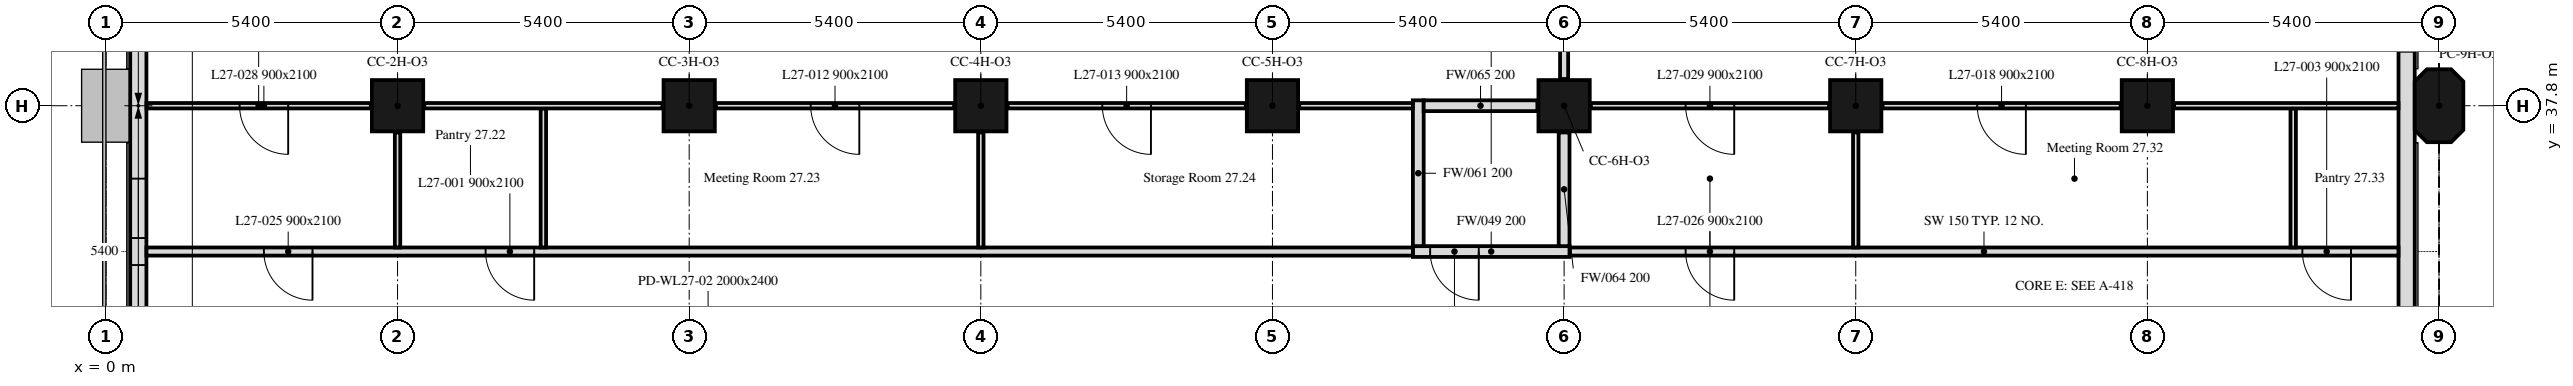
"""IFC4 building model, lengths in metres.
Left out: names, types, materials, properties, quantities, classifications, styles, units other than length and angle.
Written with IfcOpenShell. Run it as: python <this file> out.ifc"""

import sys

from ifc_helpers import new_model, si_unit, direction, frame, frame_2d, origin, origin_2d, place, context, subcontext, project, spatial, polyline, rectangle, outline, extrude, element, fill, save


model = new_model("IFC4")
c1 = context("Model", 3, precision=1e-05, world=origin(), true_north=direction((0.0, 1.0)))
c2 = subcontext(c1, "Body", "Model", "MODEL_VIEW")
j1 = project(units=[si_unit("LENGTHUNIT", "METRE"), si_unit("PLANEANGLEUNIT", "RADIAN")], contexts=[c1])
p1 = place(None, origin())
s1 = spatial("IfcSite", under=j1, at=p1, CompositionType="ELEMENT")
p2 = place(p1, origin())
s2 = spatial("IfcBuilding", under=s1, at=p2, CompositionType="ELEMENT")
p3 = place(p2, frame((0.0, 0.0, 114.4)))
s3 = spatial("IfcBuildingStorey", under=s2, at=p3, CompositionType="ELEMENT", Elevation=114.4)
for number, where, z_axis, x_axis in (
    (1, (5.4, 37.8, 0.0), (0.0, 0.0, 1.0), (1.0, 0.0, 0.0)),
    (2, (10.8, 37.8, 0.0), (0.0, 0.0, 1.0), (1.0, 0.0, 0.0)),
    (3, (16.2, 37.8, 0.0), (0.0, 0.0, 1.0), (1.0, 0.0, 0.0)),
    (4, (21.6, 37.8, 0.0), (0.0, 0.0, 1.0), (1.0, 0.0, 0.0)),
    (5, (27.0, 37.8, 0.0), (0.0, 0.0, 1.0), (1.0, 0.0, 0.0)),
    (6, (32.4, 37.8, 0.0), (0.0, 0.0, 1.0), (1.0, 0.0, 0.0)),
    (7, (37.8, 37.8, 0.0), (0.0, 0.0, 1.0), (1.0, 0.0, 0.0)),
):
    element("IfcColumn", number, at=place(p3, frame(where, z_axis=z_axis, x_axis=x_axis)), inside=s3, PredefinedType="COLUMN", context=c2, shape_type="SweptSolid", body=[
        extrude(rectangle(XDim=0.95, YDim=0.95, at=origin_2d()), origin(), (0.0, 0.0, 1.0), 3.5),
    ])
p4 = place(p3, frame((43.2, 37.8, 0.0), z_axis=(0.0, 0.0, 1.0), x_axis=(0.0, 1.0, 0.0)))
e8 = element("IfcColumn", 8, at=p4, inside=s3, PredefinedType="COLUMN", context=c2, shape_type="SweptSolid", body=[
    extrude(outline(polyline([(-0.45, -0.45), (0.45, -0.45), (0.675, -0.225), (0.675, 0.225), (0.45, 0.45), (-0.45, 0.45), (-0.675, 0.225), (-0.675, -0.225), (-0.45, -0.45)])), origin(), (0.0, 0.0, 1.0), 3.5),
])
p5 = place(p3, frame((42.6, 32.4, 0.0), z_axis=(0.0, 0.0, 1.0), x_axis=(0.0, 1.0, 0.0)))
e9 = element("IfcWall", 9, at=p5, inside=s3, PredefinedType="SOLIDWALL", context=c2, shape_type="SweptSolid", body=[
    extrude(rectangle(XDim=10.614, YDim=0.3, at=frame_2d((5.307, 0.0))), origin(), (0.0, 0.0, 1.0), 3.5),
])
p6 = place(p5, frame((6.4, 0.0, 0.9)))
e10 = element("IfcOpeningElement", 10, at=p6, cuts=e9, PredefinedType="OPENING", context=c2, shape_type="SweptSolid", body=[
    extrude(rectangle(XDim=3.4, YDim=1.7, at=frame_2d((1.7, 0.85))), frame((0.0, 0.16, 0.0), z_axis=(0.0, -1.0, 0.0), x_axis=(1.0, 0.0, 0.0)), (0.0, 0.0, 1.0), 0.32),
])
p7 = place(p3, frame((0.6, 43.014, 0.0), z_axis=(0.0, 0.0, 1.0), x_axis=(0.0, -1.0, 0.0)))
e11 = element("IfcWall", 11, at=p7, inside=s3, PredefinedType="SOLIDWALL", context=c2, shape_type="SweptSolid", body=[
    extrude(rectangle(XDim=32.027, YDim=0.3, at=frame_2d((16.014, 0.0))), origin(), (0.0, 0.0, 1.0), 3.5),
])
p8 = place(p7, frame((6.564, 0.0, 0.9)))
e12 = element("IfcOpeningElement", 12, at=p8, cuts=e11, PredefinedType="OPENING", context=c2, shape_type="SweptSolid", body=[
    extrude(rectangle(XDim=1.1, YDim=1.7, at=frame_2d((0.55, 0.85))), frame((0.0, 0.16, 0.0), z_axis=(0.0, -1.0, 0.0), x_axis=(1.0, 0.0, 0.0)), (0.0, 0.0, 1.0), 0.32),
])
p9 = place(p7, frame((8.164, 0.0, 0.9)))
e13 = element("IfcOpeningElement", 13, at=p9, cuts=e11, PredefinedType="OPENING", context=c2, shape_type="SweptSolid", body=[
    extrude(rectangle(XDim=1.1, YDim=1.7, at=frame_2d((0.55, 0.85))), frame((0.0, 0.16, 0.0), z_axis=(0.0, -1.0, 0.0), x_axis=(1.0, 0.0, 0.0)), (0.0, 0.0, 1.0), 0.32),
])
p10 = place(p7, frame((17.014, 0.0, 0.9)))
e14 = element("IfcOpeningElement", 14, at=p10, cuts=e11, PredefinedType="OPENING", context=c2, shape_type="SweptSolid", body=[
    extrude(rectangle(XDim=3.4, YDim=1.7, at=frame_2d((1.7, 0.85))), frame((0.0, 0.16, 0.0), z_axis=(0.0, -1.0, 0.0), x_axis=(1.0, 0.0, 0.0)), (0.0, 0.0, 1.0), 0.32),
])
p11 = place(p7, frame((28.164, 0.0, 0.9)))
e15 = element("IfcOpeningElement", 15, at=p11, cuts=e11, PredefinedType="OPENING", context=c2, shape_type="SweptSolid", body=[
    extrude(rectangle(XDim=1.1, YDim=1.7, at=frame_2d((0.55, 0.85))), frame((0.0, 0.16, 0.0), z_axis=(0.0, -1.0, 0.0), x_axis=(1.0, 0.0, 0.0)), (0.0, 0.0, 1.0), 0.32),
])
p12 = place(p7, frame((29.764, 0.0, 0.9)))
e16 = element("IfcOpeningElement", 16, at=p12, cuts=e11, PredefinedType="OPENING", context=c2, shape_type="SweptSolid", body=[
    extrude(rectangle(XDim=1.1, YDim=1.7, at=frame_2d((0.55, 0.85))), frame((0.0, 0.16, 0.0), z_axis=(0.0, -1.0, 0.0), x_axis=(1.0, 0.0, 0.0)), (0.0, 0.0, 1.0), 0.32),
])
p13 = place(p3, frame((42.449, 35.1, 0.0), z_axis=(0.0, 0.0, 1.0), x_axis=(-1.0, 0.0, 0.0)))
e17 = element("IfcWall", 17, at=p13, inside=s3, PredefinedType="PARTITIONING", context=c2, shape_type="SweptSolid", body=[
    extrude(rectangle(XDim=15.349, YDim=0.15, at=frame_2d((7.674, 0.0))), origin(), (0.0, 0.0, 1.0), 2.75),
])
p14 = place(p13, frame((0.879, 0.0, 0.0)))
e18 = element("IfcOpeningElement", 18, at=p14, cuts=e17, PredefinedType="OPENING", context=c2, shape_type="SweptSolid", body=[
    extrude(rectangle(XDim=0.9, YDim=2.1, at=frame_2d((0.45, 1.05))), frame((0.0, 0.075, 0.0), z_axis=(0.0, -1.0, 0.0), x_axis=(1.0, 0.0, 0.0)), (0.0, 0.0, 1.0), 0.15),
])
p15 = place(p13, frame((12.299, 0.0, 0.0)))
e19 = element("IfcOpeningElement", 19, at=p15, cuts=e17, PredefinedType="OPENING", context=c2, shape_type="SweptSolid", body=[
    extrude(rectangle(XDim=0.9, YDim=2.1, at=frame_2d((0.45, 1.05))), frame((0.0, 0.075, 0.0), z_axis=(0.0, -1.0, 0.0), x_axis=(1.0, 0.0, 0.0)), (0.0, 0.0, 1.0), 0.15),
])
p16 = place(p3, frame((27.1, 35.1, 0.0), z_axis=(0.0, 0.0, 1.0), x_axis=(-1.0, 0.0, 0.0)))
e20 = element("IfcWall", 20, at=p16, inside=s3, PredefinedType="PARTITIONING", context=c2, shape_type="SweptSolid", body=[
    extrude(rectangle(XDim=2.9, YDim=0.2, at=frame_2d((1.45, 0.0))), origin(), (0.0, 0.0, 1.0), 2.75),
])
p17 = place(p16, frame((1.68, 0.0, 0.0)))
e21 = element("IfcOpeningElement", 21, at=p17, cuts=e20, PredefinedType="OPENING", context=c2, shape_type="SweptSolid", body=[
    extrude(rectangle(XDim=0.9, YDim=2.1, at=frame_2d((0.45, 1.05))), frame((0.0, 0.1, 0.0), z_axis=(0.0, -1.0, 0.0), x_axis=(1.0, 0.0, 0.0)), (0.0, 0.0, 1.0), 0.2),
])
p18 = place(p3, frame((24.2, 35.1, 0.0), z_axis=(0.0, 0.0, 1.0), x_axis=(-1.0, 0.0, 0.0)))
e22 = element("IfcWall", 22, at=p18, inside=s3, PredefinedType="PARTITIONING", context=c2, shape_type="SweptSolid", body=[
    extrude(rectangle(XDim=23.449, YDim=0.15, at=frame_2d((11.725, 0.0))), origin(), (0.0, 0.0, 1.0), 2.75),
])
p19 = place(p18, frame((16.27, 0.0, 0.0)))
e23 = element("IfcOpeningElement", 23, at=p19, cuts=e22, PredefinedType="OPENING", context=c2, shape_type="SweptSolid", body=[
    extrude(rectangle(XDim=0.9, YDim=2.1, at=frame_2d((0.45, 1.05))), frame((0.0, 0.075, 0.0), z_axis=(0.0, -1.0, 0.0), x_axis=(1.0, 0.0, 0.0)), (0.0, 0.0, 1.0), 0.15),
])
p20 = place(p18, frame((20.375, 0.0, 0.0)))
e24 = element("IfcOpeningElement", 24, at=p20, cuts=e22, PredefinedType="OPENING", context=c2, shape_type="SweptSolid", body=[
    extrude(rectangle(XDim=0.9, YDim=2.1, at=frame_2d((0.45, 1.05))), frame((0.0, 0.075, 0.0), z_axis=(0.0, -1.0, 0.0), x_axis=(1.0, 0.0, 0.0)), (0.0, 0.0, 1.0), 0.15),
])
p21 = place(p3, frame((4.905, 37.8, 0.0), z_axis=(0.0, 0.0, 1.0), x_axis=(-1.0, 0.0, 0.0)))
e25 = element("IfcWall", 25, at=p21, inside=s3, PredefinedType="PARTITIONING", context=c2, shape_type="SweptSolid", body=[
    extrude(rectangle(XDim=4.154, YDim=0.1, at=frame_2d((2.077, 0.0))), origin(), (0.0, 0.0, 1.0), 2.75),
])
p22 = place(p21, frame((1.53, 0.0, 0.0)))
e26 = element("IfcOpeningElement", 26, at=p22, cuts=e25, PredefinedType="OPENING", context=c2, shape_type="SweptSolid", body=[
    extrude(rectangle(XDim=0.9, YDim=2.1, at=frame_2d((0.45, 1.05))), frame((0.0, 0.05, 0.0), z_axis=(0.0, -1.0, 0.0), x_axis=(1.0, 0.0, 0.0)), (0.0, 0.0, 1.0), 0.1),
])
p23 = place(p3, frame((5.4, 35.175, 0.0), z_axis=(0.0, 0.0, 1.0), x_axis=(0.0, 1.0, 0.0)))
e27 = element("IfcWall", 27, at=p23, inside=s3, PredefinedType="PARTITIONING", context=c2, shape_type="SweptSolid", body=[
    extrude(rectangle(XDim=2.13, YDim=0.1, at=frame_2d((1.065, 0.0))), origin(), (0.0, 0.0, 1.0), 3.5),
])
p24 = place(p3, frame((8.1, 35.175, 0.0), z_axis=(0.0, 0.0, 1.0), x_axis=(0.0, 1.0, 0.0)))
e28 = element("IfcWall", 28, at=p24, inside=s3, PredefinedType="PARTITIONING", context=c2, shape_type="SweptSolid", body=[
    extrude(rectangle(XDim=2.575, YDim=0.1, at=frame_2d((1.288, 0.0))), origin(), (0.0, 0.0, 1.0), 3.5),
])
p25 = place(p3, frame((16.2, 35.175, 0.0), z_axis=(0.0, 0.0, 1.0), x_axis=(0.0, 1.0, 0.0)))
e29 = element("IfcWall", 29, at=p25, inside=s3, PredefinedType="PARTITIONING", context=c2, shape_type="SweptSolid", body=[
    extrude(rectangle(XDim=2.13, YDim=0.1, at=frame_2d((1.065, 0.0))), origin(), (0.0, 0.0, 1.0), 2.75),
])
p26 = place(p3, frame((15.705, 37.8, 0.0), z_axis=(0.0, 0.0, 1.0), x_axis=(-1.0, 0.0, 0.0)))
e30 = element("IfcWall", 30, at=p26, inside=s3, PredefinedType="PARTITIONING", context=c2, shape_type="SweptSolid", body=[
    extrude(rectangle(XDim=4.41, YDim=0.1, at=frame_2d((2.205, 0.0))), origin(), (0.0, 0.0, 1.0), 2.75),
])
p27 = place(p26, frame((1.755, 0.0, 0.0)))
e31 = element("IfcOpeningElement", 31, at=p27, cuts=e30, PredefinedType="OPENING", context=c2, shape_type="SweptSolid", body=[
    extrude(rectangle(XDim=0.9, YDim=2.1, at=frame_2d((0.45, 1.05))), frame((0.0, 0.05, 0.0), z_axis=(0.0, -1.0, 0.0), x_axis=(1.0, 0.0, 0.0)), (0.0, 0.0, 1.0), 0.1),
])
p28 = place(p3, frame((10.305, 37.8, 0.0), z_axis=(0.0, 0.0, 1.0), x_axis=(-1.0, 0.0, 0.0)))
e32 = element("IfcWall", 32, at=p28, inside=s3, PredefinedType="PARTITIONING", context=c2, shape_type="SweptSolid", body=[
    extrude(rectangle(XDim=4.41, YDim=0.1, at=frame_2d((2.205, 0.0))), origin(), (0.0, 0.0, 1.0), 2.75),
])
p29 = place(p3, frame((24.3, 35.2, 0.0), z_axis=(0.0, 0.0, 1.0), x_axis=(0.0, 1.0, 0.0)))
e33 = element("IfcWall", 33, at=p29, inside=s3, PredefinedType="PARTITIONING", context=c2, shape_type="SweptSolid", body=[
    extrude(rectangle(XDim=2.7, YDim=0.2, at=frame_2d((1.35, 0.0))), origin(), (0.0, 0.0, 1.0), 3.5),
])
p30 = place(p3, frame((24.2, 37.8, 0.0), z_axis=(0.0, 0.0, 1.0), x_axis=(-1.0, 0.0, 0.0)))
e34 = element("IfcWall", 34, at=p30, inside=s3, PredefinedType="PARTITIONING", context=c2, shape_type="SweptSolid", body=[
    extrude(rectangle(XDim=2.105, YDim=0.1, at=frame_2d((1.052, 0.0))), origin(), (0.0, 0.0, 1.0), 3.5),
])
p31 = place(p3, frame((21.105, 37.8, 0.0), z_axis=(0.0, 0.0, 1.0), x_axis=(-1.0, 0.0, 0.0)))
e35 = element("IfcWall", 35, at=p31, inside=s3, PredefinedType="PARTITIONING", context=c2, shape_type="SweptSolid", body=[
    extrude(rectangle(XDim=4.41, YDim=0.1, at=frame_2d((2.205, 0.0))), origin(), (0.0, 0.0, 1.0), 3.5),
])
p32 = place(p31, frame((1.755, 0.0, 0.0)))
e36 = element("IfcOpeningElement", 36, at=p32, cuts=e35, PredefinedType="OPENING", context=c2, shape_type="SweptSolid", body=[
    extrude(rectangle(XDim=0.9, YDim=2.1, at=frame_2d((0.45, 1.05))), frame((0.0, 0.05, 0.0), z_axis=(0.0, -1.0, 0.0), x_axis=(1.0, 0.0, 0.0)), (0.0, 0.0, 1.0), 0.1),
])
p33 = place(p3, frame((27.0, 35.2, 0.0), z_axis=(0.0, 0.0, 1.0), x_axis=(0.0, 1.0, 0.0)))
e37 = element("IfcWall", 37, at=p33, inside=s3, PredefinedType="PARTITIONING", context=c2, shape_type="SweptSolid", body=[
    extrude(rectangle(XDim=2.105, YDim=0.2, at=frame_2d((1.052, 0.0))), origin(), (0.0, 0.0, 1.0), 2.75),
])
p34 = place(p3, frame((26.505, 37.8, 0.0), z_axis=(0.0, 0.0, 1.0), x_axis=(-1.0, 0.0, 0.0)))
e38 = element("IfcWall", 38, at=p34, inside=s3, PredefinedType="PARTITIONING", context=c2, shape_type="SweptSolid", body=[
    extrude(rectangle(XDim=2.105, YDim=0.2, at=frame_2d((1.052, 0.0))), origin(), (0.0, 0.0, 1.0), 3.5),
])
p35 = place(p3, frame((27.0, 38.295, 0.0), z_axis=(0.0, 0.0, 1.0), x_axis=(0.0, 1.0, 0.0)))
e39 = element("IfcWall", 39, at=p35, inside=s3, PredefinedType="PARTITIONING", context=c2, shape_type="SweptSolid", body=[
    extrude(rectangle(XDim=4.41, YDim=0.15, at=frame_2d((2.205, 0.0))), origin(), (0.0, 0.0, 1.0), 2.75),
])
p36 = place(p3, frame((32.4, 35.175, 0.0), z_axis=(0.0, 0.0, 1.0), x_axis=(0.0, 1.0, 0.0)))
e40 = element("IfcWall", 40, at=p36, inside=s3, PredefinedType="PARTITIONING", context=c2, shape_type="SweptSolid", body=[
    extrude(rectangle(XDim=2.13, YDim=0.1, at=frame_2d((1.065, 0.0))), origin(), (0.0, 0.0, 1.0), 2.75),
])
p37 = place(p3, frame((31.905, 37.8, 0.0), z_axis=(0.0, 0.0, 1.0), x_axis=(-1.0, 0.0, 0.0)))
e41 = element("IfcWall", 41, at=p37, inside=s3, PredefinedType="PARTITIONING", context=c2, shape_type="SweptSolid", body=[
    extrude(rectangle(XDim=4.41, YDim=0.1, at=frame_2d((2.205, 0.0))), origin(), (0.0, 0.0, 1.0), 3.5),
])
p38 = place(p37, frame((1.755, 0.0, 0.0)))
e42 = element("IfcOpeningElement", 42, at=p38, cuts=e41, PredefinedType="OPENING", context=c2, shape_type="SweptSolid", body=[
    extrude(rectangle(XDim=0.9, YDim=2.1, at=frame_2d((0.45, 1.05))), frame((0.0, 0.05, 0.0), z_axis=(0.0, -1.0, 0.0), x_axis=(1.0, 0.0, 0.0)), (0.0, 0.0, 1.0), 0.1),
])
p39 = place(p3, frame((40.5, 35.175, 0.0), z_axis=(0.0, 0.0, 1.0), x_axis=(0.0, 1.0, 0.0)))
e43 = element("IfcWall", 43, at=p39, inside=s3, PredefinedType="PARTITIONING", context=c2, shape_type="SweptSolid", body=[
    extrude(rectangle(XDim=2.575, YDim=0.1, at=frame_2d((1.288, 0.0))), origin(), (0.0, 0.0, 1.0), 3.5),
])
p40 = place(p3, frame((37.305, 37.8, 0.0), z_axis=(0.0, 0.0, 1.0), x_axis=(-1.0, 0.0, 0.0)))
e44 = element("IfcWall", 44, at=p40, inside=s3, PredefinedType="PARTITIONING", context=c2, shape_type="SweptSolid", body=[
    extrude(rectangle(XDim=4.41, YDim=0.1, at=frame_2d((2.205, 0.0))), origin(), (0.0, 0.0, 1.0), 3.5),
])
p41 = place(p40, frame((1.755, 0.0, 0.0)))
e45 = element("IfcOpeningElement", 45, at=p41, cuts=e44, PredefinedType="OPENING", context=c2, shape_type="SweptSolid", body=[
    extrude(rectangle(XDim=0.9, YDim=2.1, at=frame_2d((0.45, 1.05))), frame((0.0, 0.05, 0.0), z_axis=(0.0, -1.0, 0.0), x_axis=(1.0, 0.0, 0.0)), (0.0, 0.0, 1.0), 0.1),
])
p42 = place(p3, frame((42.449, 37.8, 0.0), z_axis=(0.0, 0.0, 1.0), x_axis=(-1.0, 0.0, 0.0)))
e46 = element("IfcWall", 46, at=p42, inside=s3, PredefinedType="PARTITIONING", context=c2, shape_type="SweptSolid", body=[
    extrude(rectangle(XDim=4.154, YDim=0.1, at=frame_2d((2.077, 0.0))), origin(), (0.0, 0.0, 1.0), 3.5),
])
p43 = place(p6, origin())
e47 = element("IfcWindow", 47, at=p43, inside=s3, PartitioningType="SINGLE_PANEL", PredefinedType="WINDOW", context=c2, shape_type="SweptSolid", body=[
    extrude(rectangle(XDim=3.4, YDim=1.7, at=frame_2d((1.7, 0.85))), frame((0.0, 0.03, 0.0), z_axis=(0.0, -1.0, 0.0), x_axis=(1.0, 0.0, 0.0)), (0.0, 0.0, 1.0), 0.06),
])
fill(e10, e47)
p44 = place(p8, origin())
e48 = element("IfcWindow", 48, at=p44, inside=s3, PartitioningType="SINGLE_PANEL", PredefinedType="WINDOW", context=c2, shape_type="SweptSolid", body=[
    extrude(rectangle(XDim=1.1, YDim=1.7, at=frame_2d((0.55, 0.85))), frame((0.0, 0.03, 0.0), z_axis=(0.0, -1.0, 0.0), x_axis=(1.0, 0.0, 0.0)), (0.0, 0.0, 1.0), 0.06),
])
fill(e12, e48)
p45 = place(p9, origin())
e49 = element("IfcWindow", 49, at=p45, inside=s3, PartitioningType="SINGLE_PANEL", PredefinedType="WINDOW", context=c2, shape_type="SweptSolid", body=[
    extrude(rectangle(XDim=1.1, YDim=1.7, at=frame_2d((0.55, 0.85))), frame((0.0, 0.03, 0.0), z_axis=(0.0, -1.0, 0.0), x_axis=(1.0, 0.0, 0.0)), (0.0, 0.0, 1.0), 0.06),
])
fill(e13, e49)
p46 = place(p19, origin())
e50 = element("IfcDoor", 50, at=p46, inside=s3, OperationType="SINGLE_SWING_RIGHT", PredefinedType="DOOR", context=c2, shape_type="SweptSolid", body=[
    extrude(rectangle(XDim=0.9, YDim=2.1, at=frame_2d((0.45, 1.05))), frame((0.0, 0.025, 0.0), z_axis=(0.0, -1.0, 0.0), x_axis=(1.0, 0.0, 0.0)), (0.0, 0.0, 1.0), 0.05),
])
fill(e23, e50)
p47 = place(p17, origin())
e51 = element("IfcDoor", 51, at=p47, inside=s3, OperationType="SINGLE_SWING_LEFT", PredefinedType="DOOR", context=c2, shape_type="SweptSolid", body=[
    extrude(rectangle(XDim=0.9, YDim=2.1, at=frame_2d((0.45, 1.05))), frame((0.0, 0.025, 0.0), z_axis=(0.0, -1.0, 0.0), x_axis=(1.0, 0.0, 0.0)), (0.0, 0.0, 1.0), 0.05),
])
fill(e21, e51)
p48 = place(p14, origin())
e52 = element("IfcDoor", 52, at=p48, inside=s3, OperationType="SINGLE_SWING_RIGHT", PredefinedType="DOOR", context=c2, shape_type="SweptSolid", body=[
    extrude(rectangle(XDim=0.9, YDim=2.1, at=frame_2d((0.45, 1.05))), frame((0.0, 0.025, 0.0), z_axis=(0.0, -1.0, 0.0), x_axis=(1.0, 0.0, 0.0)), (0.0, 0.0, 1.0), 0.05),
])
fill(e18, e52)
p49 = place(p27, origin())
e53 = element("IfcDoor", 53, at=p49, inside=s3, OperationType="SINGLE_SWING_LEFT", PredefinedType="DOOR", context=c2, shape_type="SweptSolid", body=[
    extrude(rectangle(XDim=0.9, YDim=2.1, at=frame_2d((0.45, 1.05))), frame((0.0, 0.025, 0.0), z_axis=(0.0, -1.0, 0.0), x_axis=(1.0, 0.0, 0.0)), (0.0, 0.0, 1.0), 0.05),
])
fill(e31, e53)
p50 = place(p32, origin())
e54 = element("IfcDoor", 54, at=p50, inside=s3, OperationType="SINGLE_SWING_RIGHT", PredefinedType="DOOR", context=c2, shape_type="SweptSolid", body=[
    extrude(rectangle(XDim=0.9, YDim=2.1, at=frame_2d((0.45, 1.05))), frame((0.0, 0.025, 0.0), z_axis=(0.0, -1.0, 0.0), x_axis=(1.0, 0.0, 0.0)), (0.0, 0.0, 1.0), 0.05),
])
fill(e36, e54)
p51 = place(p41, origin())
e55 = element("IfcDoor", 55, at=p51, inside=s3, OperationType="SINGLE_SWING_RIGHT", PredefinedType="DOOR", context=c2, shape_type="SweptSolid", body=[
    extrude(rectangle(XDim=0.9, YDim=2.1, at=frame_2d((0.45, 1.05))), frame((0.0, 0.025, 0.0), z_axis=(0.0, -1.0, 0.0), x_axis=(1.0, 0.0, 0.0)), (0.0, 0.0, 1.0), 0.05),
])
fill(e45, e55)
p52 = place(p20, origin())
e56 = element("IfcDoor", 56, at=p52, inside=s3, OperationType="SINGLE_SWING_RIGHT", PredefinedType="DOOR", context=c2, shape_type="SweptSolid", body=[
    extrude(rectangle(XDim=0.9, YDim=2.1, at=frame_2d((0.45, 1.05))), frame((0.0, 0.025, 0.0), z_axis=(0.0, -1.0, 0.0), x_axis=(1.0, 0.0, 0.0)), (0.0, 0.0, 1.0), 0.05),
])
fill(e24, e56)
p53 = place(p15, origin())
e57 = element("IfcDoor", 57, at=p53, inside=s3, OperationType="SINGLE_SWING_RIGHT", PredefinedType="DOOR", context=c2, shape_type="SweptSolid", body=[
    extrude(rectangle(XDim=0.9, YDim=2.1, at=frame_2d((0.45, 1.05))), frame((0.0, 0.025, 0.0), z_axis=(0.0, -1.0, 0.0), x_axis=(1.0, 0.0, 0.0)), (0.0, 0.0, 1.0), 0.05),
])
fill(e19, e57)
p54 = place(p22, origin())
e58 = element("IfcDoor", 58, at=p54, inside=s3, OperationType="SINGLE_SWING_RIGHT", PredefinedType="DOOR", context=c2, shape_type="SweptSolid", body=[
    extrude(rectangle(XDim=0.9, YDim=2.1, at=frame_2d((0.45, 1.05))), frame((0.0, 0.025, 0.0), z_axis=(0.0, -1.0, 0.0), x_axis=(1.0, 0.0, 0.0)), (0.0, 0.0, 1.0), 0.05),
])
fill(e26, e58)
p55 = place(p38, origin())
e59 = element("IfcDoor", 59, at=p55, inside=s3, OperationType="SINGLE_SWING_LEFT", PredefinedType="DOOR", context=c2, shape_type="SweptSolid", body=[
    extrude(rectangle(XDim=0.9, YDim=2.1, at=frame_2d((0.45, 1.05))), frame((0.0, 0.025, 0.0), z_axis=(0.0, -1.0, 0.0), x_axis=(1.0, 0.0, 0.0)), (0.0, 0.0, 1.0), 0.05),
])
fill(e42, e59)
save(model, sys.argv[1])
